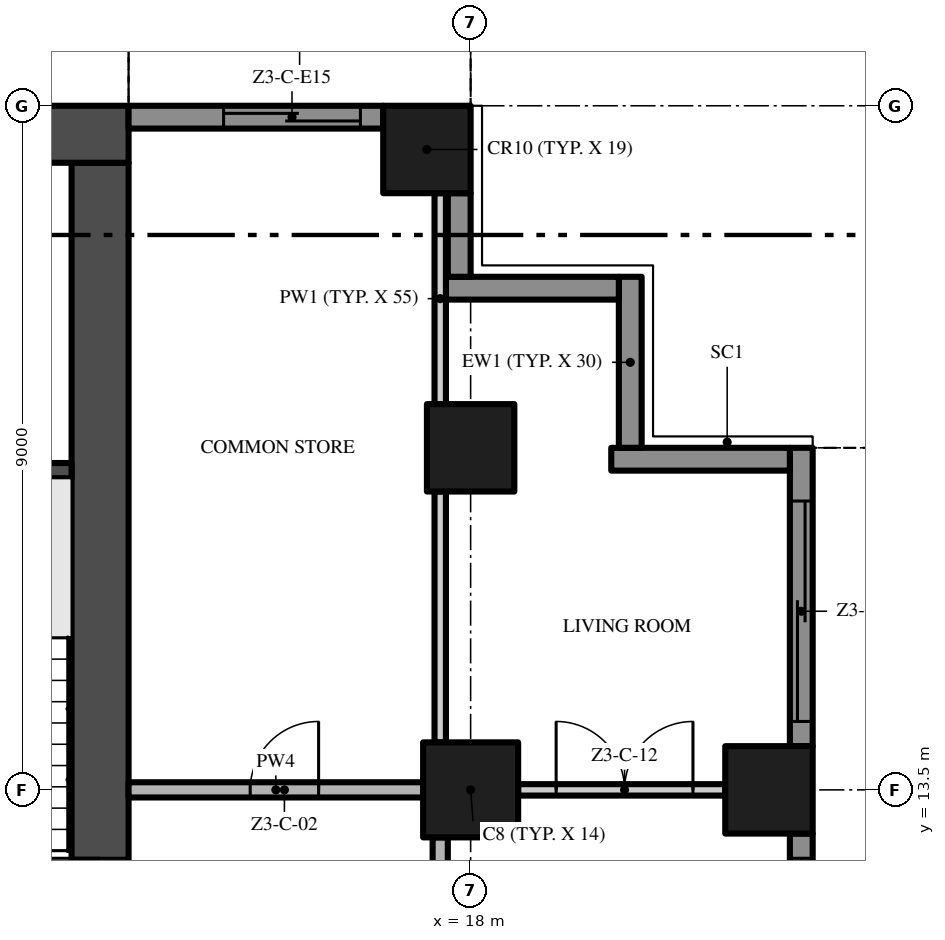
"""IFC4 building model, lengths in metres.
Left out: names, types, materials, properties, quantities, classifications, styles, units other than length and angle.
Written with IfcOpenShell. Run it as: python <this file> out.ifc"""

import sys

from ifc_helpers import new_model, si_unit, direction, frame, frame_2d, origin, origin_2d, place, context, subcontext, project, spatial, polyline, rectangle, outline, extrude, element, fill, save


model = new_model("IFC4")
c1 = context("Model", 3, precision=1e-05, world=origin(), true_north=direction((0.0, 1.0)))
c2 = subcontext(c1, "Body", "Model", "MODEL_VIEW")
j1 = project(units=[si_unit("LENGTHUNIT", "METRE"), si_unit("PLANEANGLEUNIT", "RADIAN")], contexts=[c1])
p1 = place(None, origin())
s1 = spatial("IfcSite", under=j1, at=p1, CompositionType="ELEMENT")
p2 = place(p1, origin())
s2 = spatial("IfcBuilding", under=s1, at=p2, CompositionType="ELEMENT")
p3 = place(p2, frame((0.0, 0.0, 155.4)))
s3 = spatial("IfcBuildingStorey", under=s2, at=p3, CompositionType="ELEMENT", Elevation=155.4)
p4 = place(p3, frame((13.125, 5.25, -0.3), z_axis=(0.0, 0.0, 1.0), x_axis=(0.0, 1.0, 0.0)))
e1 = element("IfcWall", 1, at=p4, inside=s3, PredefinedType="SHEAR", context=c2, shape_type="SweptSolid", body=[
    extrude(rectangle(XDim=16.5, YDim=0.75, at=frame_2d((8.25, 0.0))), origin(), (0.0, 0.0, 1.0), 3.8),
])
p5 = place(p4, frame((6.15, 0.0, 0.3)))
e2 = element("IfcOpeningElement", 2, at=p5, cuts=e1, PredefinedType="OPENING", context=c2, shape_type="SweptSolid", body=[
    extrude(rectangle(XDim=1.2, YDim=2.2, at=frame_2d((0.6, 1.1))), frame((0.0, 0.385, 0.0), z_axis=(0.0, -1.0, 0.0), x_axis=(1.0, 0.0, 0.0)), (0.0, 0.0, 1.0), 0.77),
])
p6 = place(p3, frame((13.5, 22.125, -0.3), z_axis=(0.0, 0.0, 1.0), x_axis=(-1.0, 0.0, 0.0)))
e3 = element("IfcWall", 3, at=p6, inside=s3, PredefinedType="SHEAR", context=c2, shape_type="SweptSolid", body=[
    extrude(rectangle(XDim=27.0, YDim=0.75, at=frame_2d((13.5, 0.0))), origin(), (0.0, 0.0, 1.0), 3.8),
])
p7 = place(p3, frame((18.0, 13.5, 0.0), z_axis=(0.0, 0.0, 1.0), x_axis=(1.0, 0.0, 0.0)))
e4 = element("IfcColumn", 4, at=p7, inside=s3, PredefinedType="COLUMN", context=c2, shape_type="SweptSolid", body=[
    extrude(rectangle(XDim=1.25, YDim=1.25, at=origin_2d()), origin(), (0.0, 0.0, 1.0), 3.5),
])
for number, where, z_axis, x_axis in (
    (5, (17.425, 21.925, 0.0), (0.0, 0.0, 1.0), (1.0, 0.0, 0.0)),
    (6, (21.925, 13.5, 0.0), (0.0, 0.0, 1.0), (1.0, 0.0, 0.0)),
    (7, (18.0, 18.0, 0.0), (0.0, 0.0, 1.0), (1.0, 0.0, 0.0)),
):
    element("IfcColumn", number, at=place(p3, frame(where, z_axis=z_axis, x_axis=x_axis)), inside=s3, PredefinedType="COLUMN", context=c2, shape_type="SweptSolid", body=[
        extrude(rectangle(XDim=1.15, YDim=1.15, at=origin_2d()), origin(), (0.0, 0.0, 1.0), 3.5),
    ])
p8 = place(p3, frame((22.35, 12.925, 0.0), z_axis=(0.0, 0.0, 1.0), x_axis=(0.0, -1.0, 0.0)))
e8 = element("IfcWall", 8, at=p8, inside=s3, PredefinedType="SOLIDWALL", context=c2, shape_type="SweptSolid", body=[
    extrude(rectangle(XDim=7.85, YDim=0.3, at=frame_2d((3.925, 0.0))), origin(), (0.0, 0.0, 1.0), 3.5),
])
p9 = place(p8, frame((4.625, 0.0, 0.45)))
e9 = element("IfcOpeningElement", 9, at=p9, cuts=e8, PredefinedType="OPENING", context=c2, shape_type="SweptSolid", body=[
    extrude(rectangle(XDim=2.9, YDim=2.65, at=frame_2d((1.45, 1.325))), frame((0.0, 0.16, 0.0), z_axis=(0.0, -1.0, 0.0), x_axis=(1.0, 0.0, 0.0)), (0.0, 0.0, 1.0), 0.32),
])
p10 = place(p8, frame((0.325, 0.0, 0.45)))
e10 = element("IfcOpeningElement", 10, at=p10, cuts=e8, PredefinedType="OPENING", context=c2, shape_type="SweptSolid", body=[
    extrude(rectangle(XDim=2.9, YDim=2.65, at=frame_2d((1.45, 1.325))), frame((0.0, 0.16, 0.0), z_axis=(0.0, -1.0, 0.0), x_axis=(1.0, 0.0, 0.0)), (0.0, 0.0, 1.0), 0.32),
])
p11 = place(p3, frame((22.35, 18.0, 0.0), z_axis=(0.0, 0.0, 1.0), x_axis=(0.0, -1.0, 0.0)))
e11 = element("IfcWall", 11, at=p11, inside=s3, PredefinedType="SOLIDWALL", context=c2, shape_type="SweptSolid", body=[
    extrude(rectangle(XDim=3.925, YDim=0.3, at=frame_2d((1.962, 0.0))), origin(), (0.0, 0.0, 1.0), 3.5),
])
p12 = place(p11, frame((0.7, 0.0, 0.0)))
e12 = element("IfcOpeningElement", 12, at=p12, cuts=e11, PredefinedType="OPENING", context=c2, shape_type="SweptSolid", body=[
    extrude(rectangle(XDim=2.9, YDim=2.4, at=frame_2d((1.45, 1.2))), frame((0.0, 0.16, 0.0), z_axis=(0.0, -1.0, 0.0), x_axis=(1.0, 0.0, 0.0)), (0.0, 0.0, 1.0), 0.32),
])
p13 = place(p3, frame((19.85, 17.85, 0.0), z_axis=(0.0, 0.0, 1.0), x_axis=(1.0, 0.0, 0.0)))
e13 = element("IfcWall", 13, at=p13, inside=s3, PredefinedType="SOLIDWALL", context=c2, shape_type="SweptSolid", body=[
    extrude(rectangle(XDim=2.35, YDim=0.3, at=frame_2d((1.175, 0.0))), origin(), (0.0, 0.0, 1.0), 3.5),
])
p14 = place(p3, frame((20.1, 20.25, 0.0), z_axis=(0.0, 0.0, 1.0), x_axis=(0.0, -1.0, 0.0)))
e14 = element("IfcWall", 14, at=p14, inside=s3, PredefinedType="SOLIDWALL", context=c2, shape_type="SweptSolid", body=[
    extrude(rectangle(XDim=2.25, YDim=0.3, at=frame_2d((1.125, 0.0))), origin(), (0.0, 0.0, 1.0), 3.5),
])
p15 = place(p3, frame((17.6, 20.1, 0.0), z_axis=(0.0, 0.0, 1.0), x_axis=(1.0, 0.0, 0.0)))
e15 = element("IfcWall", 15, at=p15, inside=s3, PredefinedType="SOLIDWALL", context=c2, shape_type="SweptSolid", body=[
    extrude(rectangle(XDim=2.35, YDim=0.3, at=frame_2d((1.175, 0.0))), origin(), (0.0, 0.0, 1.0), 3.5),
])
p16 = place(p3, frame((17.85, 21.35, 0.0), z_axis=(0.0, 0.0, 1.0), x_axis=(0.0, -1.0, 0.0)))
e16 = element("IfcWall", 16, at=p16, inside=s3, PredefinedType="SOLIDWALL", context=c2, shape_type="SweptSolid", body=[
    extrude(rectangle(XDim=1.1, YDim=0.3, at=frame_2d((0.55, 0.0))), origin(), (0.0, 0.0, 1.0), 3.5),
])
p17 = place(p3, frame((13.5, 22.35, 0.0), z_axis=(0.0, 0.0, 1.0), x_axis=(1.0, 0.0, 0.0)))
e17 = element("IfcWall", 17, at=p17, inside=s3, PredefinedType="SOLIDWALL", context=c2, shape_type="SweptSolid", body=[
    extrude(rectangle(XDim=3.35, YDim=0.3, at=frame_2d((1.675, 0.0))), origin(), (0.0, 0.0, 1.0), 3.5),
])
p18 = place(p17, frame((1.25, 0.0, 0.0)))
e18 = element("IfcOpeningElement", 18, at=p18, cuts=e17, PredefinedType="OPENING", context=c2, shape_type="SweptSolid", body=[
    extrude(rectangle(XDim=1.8, YDim=2.4, at=frame_2d((0.9, 1.2))), frame((0.0, 0.16, 0.0), z_axis=(0.0, -1.0, 0.0), x_axis=(1.0, 0.0, 0.0)), (0.0, 0.0, 1.0), 0.32),
])
p19 = place(p3, origin())
e19 = element("IfcWall", 19, at=p19, inside=s3, PredefinedType="USERDEFINED", context=c2, shape_type="SweptSolid", body=[
    extrude(outline(polyline([(25.149, -13.5), (24.488, -12.0), (23.755, -10.5), (23.231, -9.0), (23.1, -7.875), (23.115, -7.5), (23.451, -6.0), (24.112, -4.5), (24.845, -3.0), (25.369, -1.5), (25.5, -0.375), (25.485, 0.0), (25.149, 1.5), (24.488, 3.0), (23.755, 4.5), (23.231, 6.0), (23.1, 7.125), (23.115, 7.5), (23.451, 9.0), (24.112, 10.5), (24.845, 12.0), (25.369, 13.5), (25.5, 14.625), (25.485, 15.0), (25.149, 16.5), (24.488, 18.0), (24.259, 17.899), (24.91, 16.421), (25.236, 14.967), (25.249, 14.635), (25.124, 13.556), (24.614, 12.096), (23.885, 10.605), (23.213, 9.079), (22.866, 7.533), (22.849, 7.115), (22.986, 5.944), (23.524, 4.404), (24.261, 2.895), (24.91, 1.421), (25.236, -0.033), (25.249, -0.365), (25.124, -1.444), (24.614, -2.904), (23.885, -4.395), (23.213, -5.921), (22.866, -7.467), (22.849, -7.885), (22.986, -9.056), (23.524, -10.596), (24.261, -12.105), (24.92, -13.601), (25.149, -13.5)])), origin(), (0.0, 0.0, 1.0), 0.9),
])
p20 = place(p3, origin())
e20 = element("IfcWall", 20, at=p20, inside=s3, PredefinedType="USERDEFINED", context=c2, shape_type="SweptSolid", body=[
    extrude(outline(polyline([(18.0, 25.149), (16.5, 24.488), (15.0, 23.755), (13.5, 23.231), (13.583, 22.995), (15.096, 23.524), (16.605, 24.261), (18.101, 24.92), (18.0, 25.149)])), origin(), (0.0, 0.0, 1.0), 0.9),
])
p21 = place(p3, frame((9.65, 17.7, 0.0), z_axis=(0.0, 0.0, 1.0), x_axis=(1.0, 0.0, 0.0)))
e21 = element("IfcWall", 21, at=p21, inside=s3, PredefinedType="SHEAR", context=c2, shape_type="SweptSolid", body=[
    extrude(rectangle(XDim=3.1, YDim=0.2, at=frame_2d((1.55, 0.0))), origin(), (0.0, 0.0, 1.0), 3.5),
])
p22 = place(p3, frame((13.5, 13.5, 0.0), z_axis=(0.0, 0.0, 1.0), x_axis=(1.0, 0.0, 0.0)))
e22 = element("IfcWall", 22, at=p22, inside=s3, PredefinedType="PARTITIONING", context=c2, shape_type="SweptSolid", body=[
    extrude(rectangle(XDim=3.875, YDim=0.2, at=frame_2d((1.938, 0.0))), origin(), (0.0, 0.0, 1.0), 3.5),
])
p23 = place(p22, frame((1.6, 0.0, 0.0)))
e23 = element("IfcOpeningElement", 23, at=p23, cuts=e22, PredefinedType="OPENING", context=c2, shape_type="SweptSolid", body=[
    extrude(rectangle(XDim=0.9, YDim=2.1, at=frame_2d((0.45, 1.05))), frame((0.0, 0.11, 0.0), z_axis=(0.0, -1.0, 0.0), x_axis=(1.0, 0.0, 0.0)), (0.0, 0.0, 1.0), 0.22),
])
p24 = place(p3, frame((18.625, 13.5, 0.0), z_axis=(0.0, 0.0, 1.0), x_axis=(1.0, 0.0, 0.0)))
e24 = element("IfcWall", 24, at=p24, inside=s3, PredefinedType="PARTITIONING", context=c2, shape_type="SweptSolid", body=[
    extrude(rectangle(XDim=2.725, YDim=0.15, at=frame_2d((1.363, 0.0))), origin(), (0.0, 0.0, 1.0), 3.5),
])
p25 = place(p24, frame((0.5, 0.0, 0.0)))
e25 = element("IfcOpeningElement", 25, at=p25, cuts=e24, PredefinedType="OPENING", context=c2, shape_type="SweptSolid", body=[
    extrude(rectangle(XDim=1.8, YDim=2.4, at=frame_2d((0.9, 1.2))), frame((0.0, 0.085, 0.0), z_axis=(0.0, -1.0, 0.0), x_axis=(1.0, 0.0, 0.0)), (0.0, 0.0, 1.0), 0.17),
])
p26 = place(p3, frame((17.6, 12.875, 0.0), z_axis=(0.0, 0.0, 1.0), x_axis=(0.0, -1.0, 0.0)))
e26 = element("IfcWall", 26, at=p26, inside=s3, PredefinedType="PARTITIONING", context=c2, shape_type="SweptSolid", body=[
    extrude(rectangle(XDim=7.75, YDim=0.2, at=frame_2d((3.875, 0.0))), origin(), (0.0, 0.0, 1.0), 3.5),
])
p27 = place(p26, frame((5.55, 0.0, 0.0)))
e27 = element("IfcOpeningElement", 27, at=p27, cuts=e26, PredefinedType="OPENING", context=c2, shape_type="SweptSolid", body=[
    extrude(rectangle(XDim=1.2, YDim=2.4, at=frame_2d((0.6, 1.2))), frame((0.0, 0.11, 0.0), z_axis=(0.0, -1.0, 0.0), x_axis=(1.0, 0.0, 0.0)), (0.0, 0.0, 1.0), 0.22),
])
p28 = place(p3, frame((17.6, 14.125, 0.0), z_axis=(0.0, 0.0, 1.0), x_axis=(0.0, 1.0, 0.0)))
e28 = element("IfcWall", 28, at=p28, inside=s3, PredefinedType="PARTITIONING", context=c2, shape_type="SweptSolid", body=[
    extrude(rectangle(XDim=3.3, YDim=0.15, at=frame_2d((1.65, 0.0))), origin(), (0.0, 0.0, 1.0), 3.5),
])
p29 = place(p3, frame((17.6, 18.575, 0.0), z_axis=(0.0, 0.0, 1.0), x_axis=(0.0, 1.0, 0.0)))
e29 = element("IfcWall", 29, at=p29, inside=s3, PredefinedType="PARTITIONING", context=c2, shape_type="SweptSolid", body=[
    extrude(rectangle(XDim=2.775, YDim=0.15, at=frame_2d((1.387, 0.0))), origin(), (0.0, 0.0, 1.0), 3.5),
])
p30 = place(p10, origin())
e30 = element("IfcWindow", 30, at=p30, inside=s3, PartitioningType="SINGLE_PANEL", PredefinedType="WINDOW", context=c2, shape_type="SweptSolid", body=[
    extrude(rectangle(XDim=2.9, YDim=2.65, at=frame_2d((1.45, 1.325))), frame((0.0, 0.03, 0.0), z_axis=(0.0, -1.0, 0.0), x_axis=(1.0, 0.0, 0.0)), (0.0, 0.0, 1.0), 0.06),
])
fill(e10, e30)
p31 = place(p12, origin())
e31 = element("IfcDoor", 31, at=p31, inside=s3, OperationType="SINGLE_SWING_LEFT", PredefinedType="DOOR", context=c2, shape_type="SweptSolid", body=[
    extrude(rectangle(XDim=2.9, YDim=2.4, at=frame_2d((1.45, 1.2))), frame((0.0, 0.025, 0.0), z_axis=(0.0, -1.0, 0.0), x_axis=(1.0, 0.0, 0.0)), (0.0, 0.0, 1.0), 0.05),
])
fill(e12, e31)
p32 = place(p18, origin())
e32 = element("IfcDoor", 32, at=p32, inside=s3, OperationType="SINGLE_SWING_LEFT", PredefinedType="DOOR", context=c2, shape_type="SweptSolid", body=[
    extrude(rectangle(XDim=1.8, YDim=2.4, at=frame_2d((0.9, 1.2))), frame((0.0, 0.025, 0.0), z_axis=(0.0, -1.0, 0.0), x_axis=(1.0, 0.0, 0.0)), (0.0, 0.0, 1.0), 0.05),
])
fill(e18, e32)
p33 = place(p5, frame((1.2, 0.0, 0.0), z_axis=(0.0, 0.0, 1.0), x_axis=(-1.0, 0.0, 0.0)))
e33 = element("IfcDoor", 33, at=p33, inside=s3, OperationType="SINGLE_SWING_LEFT", PredefinedType="DOOR", context=c2, shape_type="SweptSolid", body=[
    extrude(rectangle(XDim=1.2, YDim=2.2, at=frame_2d((0.6, 1.1))), frame((0.0, 0.025, 0.0), z_axis=(0.0, -1.0, 0.0), x_axis=(1.0, 0.0, 0.0)), (0.0, 0.0, 1.0), 0.05),
])
fill(e2, e33)
p34 = place(p23, origin())
e34 = element("IfcDoor", 34, at=p34, inside=s3, OperationType="SINGLE_SWING_RIGHT", PredefinedType="DOOR", context=c2, shape_type="SweptSolid", body=[
    extrude(rectangle(XDim=0.9, YDim=2.1, at=frame_2d((0.45, 1.05))), frame((0.0, 0.025, 0.0), z_axis=(0.0, -1.0, 0.0), x_axis=(1.0, 0.0, 0.0)), (0.0, 0.0, 1.0), 0.05),
])
fill(e23, e34)
p35 = place(p25, origin())
e35 = element("IfcDoor", 35, at=p35, inside=s3, OperationType="DOUBLE_DOOR_SINGLE_SWING", PredefinedType="DOOR", context=c2, shape_type="SweptSolid", body=[
    extrude(rectangle(XDim=1.8, YDim=2.4, at=frame_2d((0.9, 1.2))), frame((0.0, 0.025, 0.0), z_axis=(0.0, -1.0, 0.0), x_axis=(1.0, 0.0, 0.0)), (0.0, 0.0, 1.0), 0.05),
])
fill(e25, e35)
save(model, sys.argv[1])
